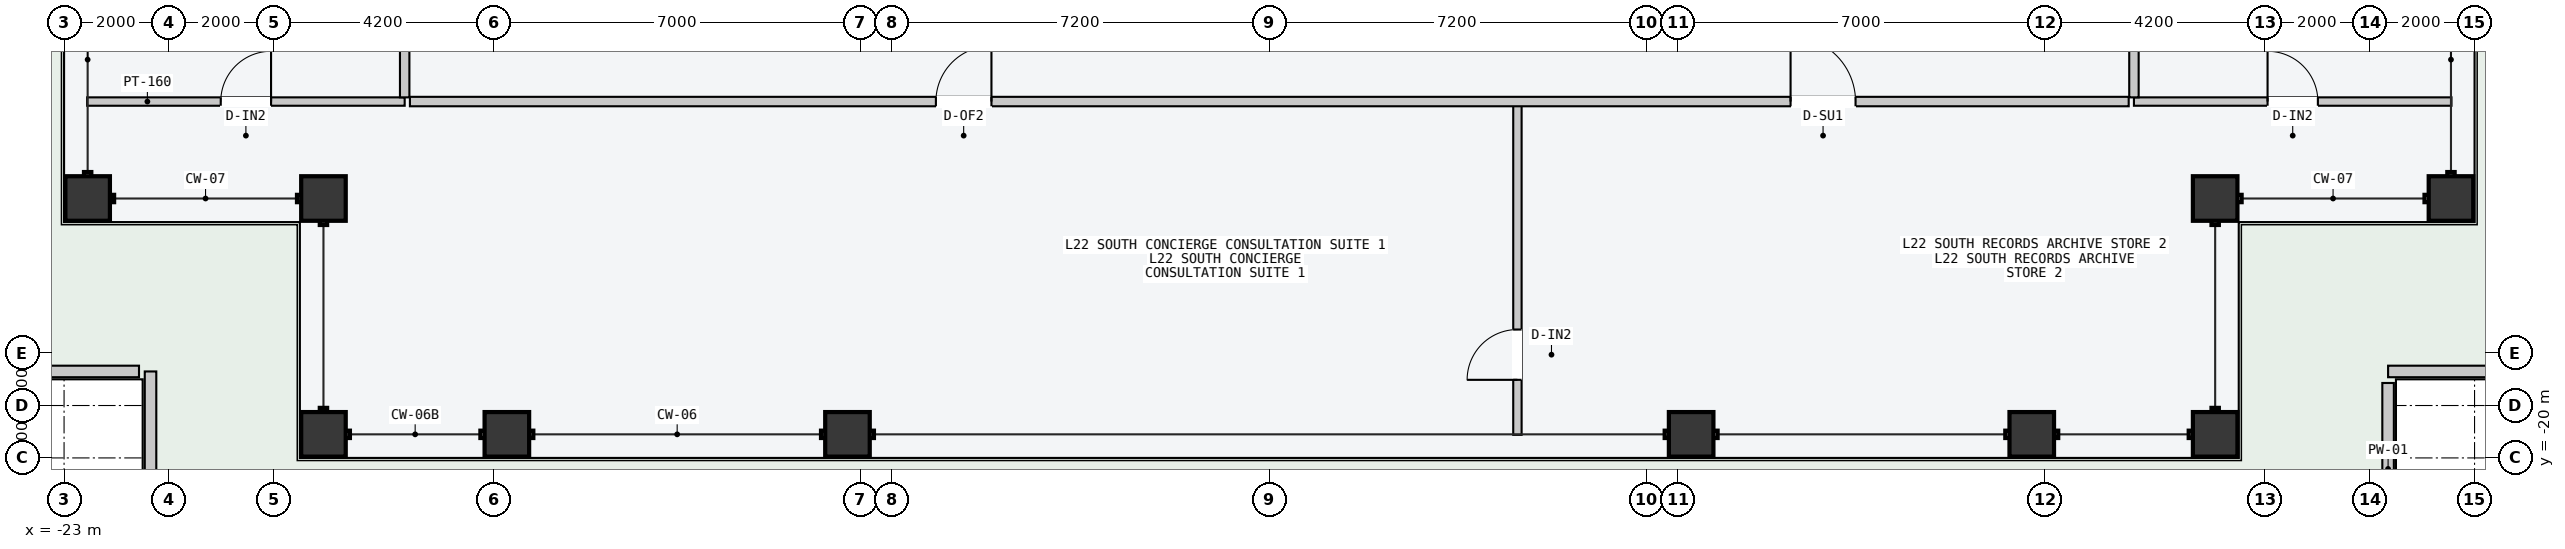
"""IFC4 building model, lengths in metres.
Left out: names, types, materials, properties, quantities, classifications, styles, units other than length and angle.
Written with IfcOpenShell. Run it as: python <this file> out.ifc"""

import sys

from ifc_helpers import new_model, si_unit, direction, frame, frame_2d, origin, origin_2d, place, context, subcontext, project, spatial, rectangle, hollow_rectangle, extrude, element, fill, save


model = new_model("IFC4")
c1 = context("Model", 3, precision=1e-05, world=origin(), true_north=direction((0.0, 1.0)))
c2 = subcontext(c1, "Body", "Model", "MODEL_VIEW")
j1 = project(units=[si_unit("LENGTHUNIT", "METRE"), si_unit("PLANEANGLEUNIT", "RADIAN")], contexts=[c1])
p1 = place(None, origin())
s1 = spatial("IfcSite", under=j1, at=p1, CompositionType="ELEMENT")
p2 = place(p1, origin())
s2 = spatial("IfcBuilding", under=s1, at=p2, CompositionType="ELEMENT")
p3 = place(p2, frame((0.0, 0.0, 87.3)))
s3 = spatial("IfcBuildingStorey", under=s2, at=p3, CompositionType="ELEMENT", Elevation=87.3)
for number, where, z_axis, x_axis in (
    (1, (-18.05, -19.55, -0.2), (0.0, 0.0, 1.0), (1.0, 0.0, 0.0)),
    (2, (-14.55, -19.55, -0.2), (0.0, 0.0, 1.0), (1.0, 0.0, 0.0)),
    (3, (-8.05, -19.55, -0.2), (0.0, 0.0, 1.0), (1.0, 0.0, 0.0)),
    (4, (8.05, -19.55, -0.2), (0.0, 0.0, 1.0), (1.0, 0.0, 0.0)),
    (5, (14.55, -19.55, -0.2), (0.0, 0.0, 1.0), (1.0, 0.0, 0.0)),
    (6, (18.05, -19.55, -0.2), (0.0, 0.0, 1.0), (1.0, 0.0, 0.0)),
    (7, (-22.55, -15.05, -0.2), (0.0, 0.0, 1.0), (0.0, 1.0, 0.0)),
    (8, (22.55, -15.05, -0.2), (0.0, 0.0, 1.0), (0.0, 1.0, 0.0)),
    (9, (18.05, -15.05, -0.2), (0.0, 0.0, 1.0), (1.0, 0.0, 0.0)),
    (10, (-18.05, -15.05, -0.2), (0.0, 0.0, 1.0), (1.0, 0.0, 0.0)),
):
    element("IfcColumn", number, at=place(p3, frame(where, z_axis=z_axis, x_axis=x_axis)), inside=s3, PredefinedType="COLUMN", context=c2, shape_type="SweptSolid", body=[
        extrude(hollow_rectangle(XDim=0.85, YDim=0.85, WallThickness=0.04, at=origin_2d()), origin(), (0.0, 0.0, 1.0), 4.7),
    ])
p4 = place(p3, frame((21.35, -21.85, 0.0), z_axis=(0.0, 0.0, 1.0), x_axis=(0.0, 1.0, 0.0)))
e11 = element("IfcWall", 11, at=p4, inside=s3, PredefinedType="PARAPET", context=c2, shape_type="SweptSolid", body=[
    extrude(rectangle(XDim=3.28, YDim=0.22, at=frame_2d((1.64, 0.0))), origin(), (0.0, 0.0, 1.0), 1.2),
])
p5 = place(p3, frame((21.35, -18.35, 0.0), z_axis=(0.0, 0.0, 1.0), x_axis=(1.0, 0.0, 0.0)))
e12 = element("IfcWall", 12, at=p5, inside=s3, PredefinedType="PARAPET", context=c2, shape_type="SweptSolid", body=[
    extrude(rectangle(XDim=3.28, YDim=0.22, at=frame_2d((1.64, 0.0))), origin(), (0.0, 0.0, 1.0), 1.2),
])
p6 = place(p3, frame((-24.85, -18.35, 0.0), z_axis=(0.0, 0.0, 1.0), x_axis=(1.0, 0.0, 0.0)))
e13 = element("IfcWall", 13, at=p6, inside=s3, PredefinedType="PARAPET", context=c2, shape_type="SweptSolid", body=[
    extrude(rectangle(XDim=3.28, YDim=0.22, at=frame_2d((1.64, 0.0))), origin(), (0.0, 0.0, 1.0), 1.2),
])
p7 = place(p3, frame((-21.35, -18.35, 0.0), z_axis=(0.0, 0.0, 1.0), x_axis=(0.0, -1.0, 0.0)))
e14 = element("IfcWall", 14, at=p7, inside=s3, PredefinedType="PARAPET", context=c2, shape_type="SweptSolid", body=[
    extrude(rectangle(XDim=3.28, YDim=0.22, at=frame_2d((1.64, 0.0))), origin(), (0.0, 0.0, 1.0), 1.2),
])
p8 = place(p3, frame((4.735, -19.56, 0.0), z_axis=(0.0, 0.0, 1.0), x_axis=(0.0, 1.0, 0.0)))
e15 = element("IfcWall", 15, at=p8, inside=s3, PredefinedType="PARTITIONING", context=c2, shape_type="SweptSolid", body=[
    extrude(rectangle(XDim=6.3, YDim=0.16, at=frame_2d((3.15, 0.0))), origin(), (0.0, 0.0, 1.0), 4.3),
])
p9 = place(p8, frame((1.05, 0.0, 0.0)))
e16 = element("IfcOpeningElement", 16, at=p9, cuts=e15, PredefinedType="OPENING", context=c2, shape_type="SweptSolid", body=[
    extrude(rectangle(XDim=0.96, YDim=2.18, at=frame_2d((0.48, 1.09))), frame((0.0, 0.09, 0.0), z_axis=(0.0, -1.0, 0.0), x_axis=(1.0, 0.0, 0.0)), (0.0, 0.0, 1.0), 0.18),
])
p10 = place(p3, frame((-16.4, -13.2, 0.0), z_axis=(0.0, 0.0, 1.0), x_axis=(1.0, 0.0, 0.0)))
e17 = element("IfcWall", 17, at=p10, inside=s3, PredefinedType="PARTITIONING", context=c2, shape_type="SweptSolid", body=[
    extrude(rectangle(XDim=32.8, YDim=0.18, at=frame_2d((16.4, 0.0))), origin(), (0.0, 0.0, 1.0), 4.3),
])
p11 = place(p10, frame((10.037, 0.0, 0.0)))
e18 = element("IfcOpeningElement", 18, at=p11, cuts=e17, PredefinedType="OPENING", context=c2, shape_type="SweptSolid", body=[
    extrude(rectangle(XDim=1.06, YDim=2.2, at=frame_2d((0.53, 1.1))), frame((0.0, 0.1, 0.0), z_axis=(0.0, -1.0, 0.0), x_axis=(1.0, 0.0, 0.0)), (0.0, 0.0, 1.0), 0.2),
])
p12 = place(p10, frame((26.347, 0.0, 0.0)))
e19 = element("IfcOpeningElement", 19, at=p12, cuts=e17, PredefinedType="OPENING", context=c2, shape_type="SweptSolid", body=[
    extrude(rectangle(XDim=1.24, YDim=2.24, at=frame_2d((0.62, 1.12))), frame((0.0, 0.1, 0.0), z_axis=(0.0, -1.0, 0.0), x_axis=(1.0, 0.0, 0.0)), (0.0, 0.0, 1.0), 0.2),
])
p13 = place(p3, frame((-22.56, -13.2, 0.0), z_axis=(0.0, 0.0, 1.0), x_axis=(1.0, 0.0, 0.0)))
e20 = element("IfcWall", 20, at=p13, inside=s3, PredefinedType="PARTITIONING", context=c2, shape_type="SweptSolid", body=[
    extrude(rectangle(XDim=6.06, YDim=0.16, at=frame_2d((3.03, 0.0))), origin(), (0.0, 0.0, 1.0), 4.3),
])
p14 = place(p13, frame((2.55, 0.0, 0.0)))
e21 = element("IfcOpeningElement", 21, at=p14, cuts=e20, PredefinedType="OPENING", context=c2, shape_type="SweptSolid", body=[
    extrude(rectangle(XDim=0.96, YDim=2.18, at=frame_2d((0.48, 1.09))), frame((0.0, 0.09, 0.0), z_axis=(0.0, -1.0, 0.0), x_axis=(1.0, 0.0, 0.0)), (0.0, 0.0, 1.0), 0.18),
])
p15 = place(p3, frame((16.5, -13.2, 0.0), z_axis=(0.0, 0.0, 1.0), x_axis=(1.0, 0.0, 0.0)))
e22 = element("IfcWall", 22, at=p15, inside=s3, PredefinedType="PARTITIONING", context=c2, shape_type="SweptSolid", body=[
    extrude(rectangle(XDim=6.06, YDim=0.16, at=frame_2d((3.03, 0.0))), origin(), (0.0, 0.0, 1.0), 4.3),
])
p16 = place(p15, frame((2.55, 0.0, 0.0)))
e23 = element("IfcOpeningElement", 23, at=p16, cuts=e22, PredefinedType="OPENING", context=c2, shape_type="SweptSolid", body=[
    extrude(rectangle(XDim=0.96, YDim=2.18, at=frame_2d((0.48, 1.09))), frame((0.0, 0.09, 0.0), z_axis=(0.0, -1.0, 0.0), x_axis=(1.0, 0.0, 0.0)), (0.0, 0.0, 1.0), 0.18),
])
p17 = place(p3, frame((-16.5, -13.12, 0.0), z_axis=(0.0, 0.0, 1.0), x_axis=(0.0, 1.0, 0.0)))
e24 = element("IfcWall", 24, at=p17, inside=s3, PredefinedType="PARTITIONING", context=c2, shape_type="SweptSolid", body=[
    extrude(rectangle(XDim=26.24, YDim=0.18, at=frame_2d((13.12, 0.0))), origin(), (0.0, 0.0, 1.0), 4.3),
])
p18 = place(p17, frame((5.031, 0.0, 0.0)))
e25 = element("IfcOpeningElement", 25, at=p18, cuts=e24, PredefinedType="OPENING", context=c2, shape_type="SweptSolid", body=[
    extrude(rectangle(XDim=0.96, YDim=2.18, at=frame_2d((0.48, 1.09))), frame((0.0, 0.1, 0.0), z_axis=(0.0, -1.0, 0.0), x_axis=(1.0, 0.0, 0.0)), (0.0, 0.0, 1.0), 0.2),
])
p19 = place(p17, frame((18.12, 0.0, 0.0)))
e26 = element("IfcOpeningElement", 26, at=p19, cuts=e24, PredefinedType="OPENING", context=c2, shape_type="SweptSolid", body=[
    extrude(rectangle(XDim=1.02, YDim=2.2, at=frame_2d((0.51, 1.1))), frame((0.0, 0.1, 0.0), z_axis=(0.0, -1.0, 0.0), x_axis=(1.0, 0.0, 0.0)), (0.0, 0.0, 1.0), 0.2),
])
p20 = place(p3, frame((16.5, -13.12, 0.0), z_axis=(0.0, 0.0, 1.0), x_axis=(0.0, 1.0, 0.0)))
e27 = element("IfcWall", 27, at=p20, inside=s3, PredefinedType="PARTITIONING", context=c2, shape_type="SweptSolid", body=[
    extrude(rectangle(XDim=26.24, YDim=0.18, at=frame_2d((13.12, 0.0))), origin(), (0.0, 0.0, 1.0), 4.3),
])
p21 = place(p20, frame((12.64, 0.0, 0.0)))
e28 = element("IfcOpeningElement", 28, at=p21, cuts=e27, PredefinedType="OPENING", context=c2, shape_type="SweptSolid", body=[
    extrude(rectangle(XDim=0.96, YDim=2.18, at=frame_2d((0.48, 1.09))), frame((0.0, 0.1, 0.0), z_axis=(0.0, -1.0, 0.0), x_axis=(1.0, 0.0, 0.0)), (0.0, 0.0, 1.0), 0.2),
])
p22 = place(p9, origin())
e29 = element("IfcDoor", 29, at=p22, inside=s3, OperationType="SINGLE_SWING_LEFT", PredefinedType="DOOR", context=c2, shape_type="SweptSolid", body=[
    extrude(rectangle(XDim=0.96, YDim=2.18, at=frame_2d((0.48, 1.09))), frame((0.0, 0.025, 0.0), z_axis=(0.0, -1.0, 0.0), x_axis=(1.0, 0.0, 0.0)), (0.0, 0.0, 1.0), 0.05),
])
fill(e16, e29)
p23 = place(p11, origin())
e30 = element("IfcDoor", 30, at=p23, inside=s3, OperationType="SINGLE_SWING_RIGHT", PredefinedType="DOOR", context=c2, shape_type="SweptSolid", body=[
    extrude(rectangle(XDim=1.06, YDim=2.2, at=frame_2d((0.53, 1.1))), frame((0.0, 0.025, 0.0), z_axis=(0.0, -1.0, 0.0), x_axis=(1.0, 0.0, 0.0)), (0.0, 0.0, 1.0), 0.05),
])
fill(e18, e30)
p24 = place(p12, origin())
e31 = element("IfcDoor", 31, at=p24, inside=s3, OperationType="SINGLE_SWING_LEFT", PredefinedType="DOOR", context=c2, shape_type="SweptSolid", body=[
    extrude(rectangle(XDim=1.24, YDim=2.24, at=frame_2d((0.62, 1.12))), frame((0.0, 0.025, 0.0), z_axis=(0.0, -1.0, 0.0), x_axis=(1.0, 0.0, 0.0)), (0.0, 0.0, 1.0), 0.05),
])
fill(e19, e31)
p25 = place(p14, origin())
e32 = element("IfcDoor", 32, at=p25, inside=s3, OperationType="SINGLE_SWING_RIGHT", PredefinedType="DOOR", context=c2, shape_type="SweptSolid", body=[
    extrude(rectangle(XDim=0.96, YDim=2.18, at=frame_2d((0.48, 1.09))), frame((0.0, 0.025, 0.0), z_axis=(0.0, -1.0, 0.0), x_axis=(1.0, 0.0, 0.0)), (0.0, 0.0, 1.0), 0.05),
])
fill(e21, e32)
p26 = place(p16, origin())
e33 = element("IfcDoor", 33, at=p26, inside=s3, OperationType="SINGLE_SWING_LEFT", PredefinedType="DOOR", context=c2, shape_type="SweptSolid", body=[
    extrude(rectangle(XDim=0.96, YDim=2.18, at=frame_2d((0.48, 1.09))), frame((0.0, 0.025, 0.0), z_axis=(0.0, -1.0, 0.0), x_axis=(1.0, 0.0, 0.0)), (0.0, 0.0, 1.0), 0.05),
])
fill(e23, e33)
save(model, sys.argv[1])
